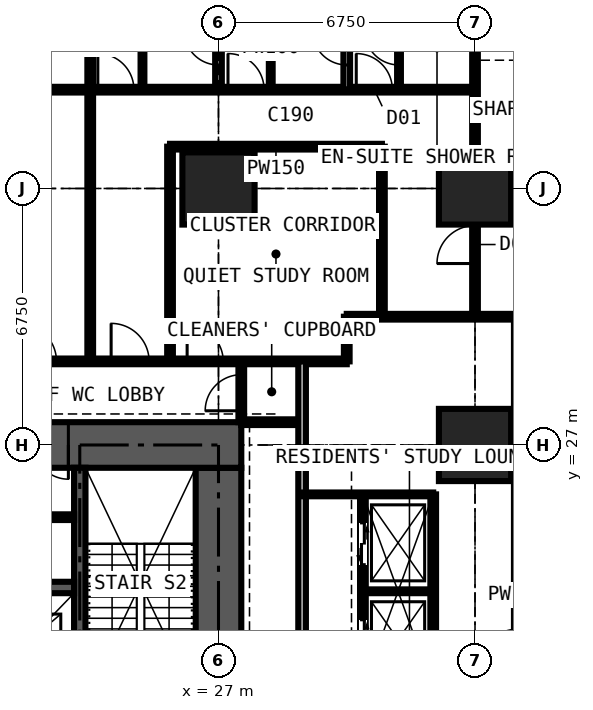
"""IFC4 building model, lengths in metres.
Left out: names, types, materials, properties, quantities, classifications, styles, units other than length and angle.
Written with IfcOpenShell. Run it as: python <this file> out.ifc"""

import sys

from ifc_helpers import new_model, si_unit, direction, frame, frame_2d, origin, origin_2d, place, context, subcontext, project, spatial, rectangle, extrude, element, fill, save


model = new_model("IFC4")
c1 = context("Model", 3, precision=1e-05, world=origin(), true_north=direction((0.0, 1.0)))
c2 = subcontext(c1, "Body", "Model", "MODEL_VIEW")
j1 = project(units=[si_unit("LENGTHUNIT", "METRE"), si_unit("PLANEANGLEUNIT", "RADIAN")], contexts=[c1])
p1 = place(None, origin())
s1 = spatial("IfcSite", under=j1, at=p1, CompositionType="ELEMENT")
p2 = place(p1, origin())
s2 = spatial("IfcBuilding", under=s1, at=p2, CompositionType="ELEMENT")
p3 = place(p2, frame((0.0, 0.0, 36.0)))
s3 = spatial("IfcBuildingStorey", under=s2, at=p3, CompositionType="ELEMENT", Elevation=36.0)
for number, where, z_axis, x_axis in (
    (1, (27.0, 33.75, 0.0), (0.0, 0.0, 1.0), (1.0, 0.0, 0.0)),
    (2, (33.75, 27.0, 0.0), (0.0, 0.0, 1.0), (1.0, 0.0, 0.0)),
    (3, (33.75, 33.75, 0.0), (0.0, 0.0, 1.0), (1.0, 0.0, 0.0)),
):
    element("IfcColumn", number, at=place(p3, frame(where, z_axis=z_axis, x_axis=x_axis)), inside=s3, PredefinedType="COLUMN", context=c2, shape_type="SweptSolid", body=[
        extrude(rectangle(XDim=1.9, YDim=1.9, at=origin_2d()), origin(), (0.0, 0.0, 1.0), 3.6),
    ])
p4 = place(p3, frame((27.0, 14.1, 0.0), z_axis=(0.0, 0.0, 1.0), x_axis=(0.0, 1.0, 0.0)))
e4 = element("IfcWall", 4, at=p4, inside=s3, PredefinedType="SHEAR", context=c2, shape_type="SweptSolid", body=[
    extrude(rectangle(XDim=12.3, YDim=1.2, at=frame_2d((6.15, 0.0))), origin(), (0.0, 0.0, 1.0), 3.6),
])
p5 = place(p4, frame((3.65, 0.0, 0.0)))
e5 = element("IfcOpeningElement", 5, at=p5, cuts=e4, PredefinedType="OPENING", context=c2, shape_type="SweptSolid", body=[
    extrude(rectangle(XDim=1.2, YDim=2.2, at=frame_2d((0.6, 1.1))), frame((0.0, 0.61, 0.0), z_axis=(0.0, -1.0, 0.0), x_axis=(1.0, 0.0, 0.0)), (0.0, 0.0, 1.0), 1.22),
])
p6 = place(p3, frame((27.6, 27.0, 0.0), z_axis=(0.0, 0.0, 1.0), x_axis=(-1.0, 0.0, 0.0)))
e6 = element("IfcWall", 6, at=p6, inside=s3, PredefinedType="SHEAR", context=c2, shape_type="SweptSolid", body=[
    extrude(rectangle(XDim=14.7, YDim=1.2, at=frame_2d((7.35, 0.0))), origin(), (0.0, 0.0, 1.0), 3.6),
])
p7 = place(p6, frame((4.55, 0.0, 0.0)))
e7 = element("IfcOpeningElement", 7, at=p7, cuts=e6, PredefinedType="OPENING", context=c2, shape_type="SweptSolid", body=[
    extrude(rectangle(XDim=0.9, YDim=2.2, at=frame_2d((0.45, 1.1))), frame((0.0, 0.61, 0.0), z_axis=(0.0, -1.0, 0.0), x_axis=(1.0, 0.0, 0.0)), (0.0, 0.0, 1.0), 1.22),
])
p8 = place(p6, frame((7.525, 0.0, 0.0)))
e8 = element("IfcOpeningElement", 8, at=p8, cuts=e6, PredefinedType="OPENING", context=c2, shape_type="SweptSolid", body=[
    extrude(rectangle(XDim=1.0, YDim=2.2, at=frame_2d((0.5, 1.1))), frame((0.0, 0.61, 0.0), z_axis=(0.0, -1.0, 0.0), x_axis=(1.0, 0.0, 0.0)), (0.0, 0.0, 1.0), 1.22),
])
p9 = place(p3, frame((23.35, 20.3, 0.0), z_axis=(0.0, 0.0, 1.0), x_axis=(0.0, 1.0, 0.0)))
e9 = element("IfcWall", 9, at=p9, inside=s3, PredefinedType="SHEAR", context=c2, shape_type="SweptSolid", body=[
    extrude(rectangle(XDim=6.1, YDim=0.3, at=frame_2d((3.05, 0.0))), origin(), (0.0, 0.0, 1.0), 3.6),
])
p10 = place(p3, frame((17.3, 23.25, 0.0), z_axis=(0.0, 0.0, 1.0), x_axis=(1.0, 0.0, 0.0)))
e10 = element("IfcWall", 10, at=p10, inside=s3, PredefinedType="SHEAR", context=c2, shape_type="SweptSolid", body=[
    extrude(rectangle(XDim=5.9, YDim=0.3, at=frame_2d((2.95, 0.0))), origin(), (0.0, 0.0, 1.0), 3.6),
])
p11 = place(p3, frame((20.8, 25.1, 0.0), z_axis=(0.0, 0.0, 1.0), x_axis=(1.0, 0.0, 0.0)))
e11 = element("IfcWall", 11, at=p11, inside=s3, PredefinedType="PARTITIONING", context=c2, shape_type="SweptSolid", body=[
    extrude(rectangle(XDim=2.4, YDim=0.15, at=frame_2d((1.2, 0.0))), origin(), (0.0, 0.0, 1.0), 3.375),
])
p12 = place(p11, frame((0.75, 0.0, 0.0)))
e12 = element("IfcOpeningElement", 12, at=p12, cuts=e11, PredefinedType="OPENING", context=c2, shape_type="SweptSolid", body=[
    extrude(rectangle(XDim=0.9, YDim=2.2, at=frame_2d((0.45, 1.1))), frame((0.0, 0.085, 0.0), z_axis=(0.0, -1.0, 0.0), x_axis=(1.0, 0.0, 0.0)), (0.0, 0.0, 1.0), 0.17),
])
p13 = place(p3, frame((10.125, 36.35, 0.0), z_axis=(0.0, 0.0, 1.0), x_axis=(1.0, 0.0, 0.0)))
e13 = element("IfcWall", 13, at=p13, inside=s3, PredefinedType="PARTITIONING", context=c2, shape_type="SweptSolid", body=[
    extrude(rectangle(XDim=23.625, YDim=0.15, at=frame_2d((11.812, 0.0))), origin(), (0.0, 0.0, 1.0), 3.375),
])
p14 = place(p13, frame((20.5, 0.0, 0.0)))
e14 = element("IfcOpeningElement", 14, at=p14, cuts=e13, PredefinedType="OPENING", context=c2, shape_type="SweptSolid", body=[
    extrude(rectangle(XDim=0.95, YDim=2.2, at=frame_2d((0.475, 1.1))), frame((0.0, 0.085, 0.0), z_axis=(0.0, -1.0, 0.0), x_axis=(1.0, 0.0, 0.0)), (0.0, 0.0, 1.0), 0.17),
])
p15 = place(p13, frame((17.125, 0.0, 0.0)))
e15 = element("IfcOpeningElement", 15, at=p15, cuts=e13, PredefinedType="OPENING", context=c2, shape_type="SweptSolid", body=[
    extrude(rectangle(XDim=0.95, YDim=2.2, at=frame_2d((0.475, 1.1))), frame((0.0, 0.085, 0.0), z_axis=(0.0, -1.0, 0.0), x_axis=(1.0, 0.0, 0.0)), (0.0, 0.0, 1.0), 0.17),
])
p16 = place(p13, frame((13.7, 0.0, 0.0)))
e16 = element("IfcOpeningElement", 16, at=p16, cuts=e13, PredefinedType="OPENING", context=c2, shape_type="SweptSolid", body=[
    extrude(rectangle(XDim=0.95, YDim=2.2, at=frame_2d((0.475, 1.1))), frame((0.0, 0.085, 0.0), z_axis=(0.0, -1.0, 0.0), x_axis=(1.0, 0.0, 0.0)), (0.0, 0.0, 1.0), 0.17),
])
p17 = place(p13, frame((4.2, 0.0, 0.0)))
e17 = element("IfcOpeningElement", 17, at=p17, cuts=e13, PredefinedType="OPENING", context=c2, shape_type="SweptSolid", body=[
    extrude(rectangle(XDim=0.95, YDim=2.2, at=frame_2d((0.475, 1.1))), frame((0.0, 0.085, 0.0), z_axis=(0.0, -1.0, 0.0), x_axis=(1.0, 0.0, 0.0)), (0.0, 0.0, 1.0), 0.17),
])
p18 = place(p13, frame((10.95, 0.0, 0.0)))
e18 = element("IfcOpeningElement", 18, at=p18, cuts=e13, PredefinedType="OPENING", context=c2, shape_type="SweptSolid", body=[
    extrude(rectangle(XDim=0.95, YDim=2.2, at=frame_2d((0.475, 1.1))), frame((0.0, 0.085, 0.0), z_axis=(0.0, -1.0, 0.0), x_axis=(1.0, 0.0, 0.0)), (0.0, 0.0, 1.0), 0.17),
])
p19 = place(p3, frame((11.3, 29.2, 0.0), z_axis=(0.0, 0.0, 1.0), x_axis=(1.0, 0.0, 0.0)))
e19 = element("IfcWall", 19, at=p19, inside=s3, PredefinedType="PARTITIONING", context=c2, shape_type="SweptSolid", body=[
    extrude(rectangle(XDim=19.075, YDim=0.15, at=frame_2d((9.538, 0.0))), origin(), (0.0, 0.0, 1.0), 3.375),
])
p20 = place(p19, frame((12.875, 0.0, 0.0)))
e20 = element("IfcOpeningElement", 20, at=p20, cuts=e19, PredefinedType="OPENING", context=c2, shape_type="SweptSolid", body=[
    extrude(rectangle(XDim=1.0, YDim=2.2, at=frame_2d((0.5, 1.1))), frame((0.0, 0.085, 0.0), z_axis=(0.0, -1.0, 0.0), x_axis=(1.0, 0.0, 0.0)), (0.0, 0.0, 1.0), 0.17),
])
p21 = place(p19, frame((10.438, 0.0, 0.0)))
e21 = element("IfcOpeningElement", 21, at=p21, cuts=e19, PredefinedType="OPENING", context=c2, shape_type="SweptSolid", body=[
    extrude(rectangle(XDim=1.0, YDim=2.2, at=frame_2d((0.5, 1.1))), frame((0.0, 0.085, 0.0), z_axis=(0.0, -1.0, 0.0), x_axis=(1.0, 0.0, 0.0)), (0.0, 0.0, 1.0), 0.17),
])
p22 = place(p19, frame((14.875, 0.0, 0.0)))
e22 = element("IfcOpeningElement", 22, at=p22, cuts=e19, PredefinedType="OPENING", context=c2, shape_type="SweptSolid", body=[
    extrude(rectangle(XDim=0.95, YDim=2.2, at=frame_2d((0.475, 1.1))), frame((0.0, 0.085, 0.0), z_axis=(0.0, -1.0, 0.0), x_axis=(1.0, 0.0, 0.0)), (0.0, 0.0, 1.0), 0.17),
])
p23 = place(p3, frame((23.625, 29.2, 0.0), z_axis=(0.0, 0.0, 1.0), x_axis=(0.0, 1.0, 0.0)))
e23 = element("IfcWall", 23, at=p23, inside=s3, PredefinedType="PARTITIONING", context=c2, shape_type="SweptSolid", body=[
    extrude(rectangle(XDim=12.034, YDim=0.15, at=frame_2d((6.017, 0.0))), origin(), (0.0, 0.0, 1.0), 3.375),
])
p24 = place(p3, frame((25.0, 36.35, 0.0), z_axis=(0.0, 0.0, 1.0), x_axis=(0.0, 1.0, 0.0)))
e24 = element("IfcWall", 24, at=p24, inside=s3, PredefinedType="PARTITIONING", context=c2, shape_type="SweptSolid", body=[
    extrude(rectangle(XDim=2.2, YDim=0.1, at=frame_2d((1.1, 0.0))), origin(), (0.0, 0.0, 1.0), 3.375),
])
p25 = place(p3, frame((25.725, 29.2, 0.0), z_axis=(0.0, 0.0, 1.0), x_axis=(0.0, 1.0, 0.0)))
e25 = element("IfcWall", 25, at=p25, inside=s3, PredefinedType="PARTITIONING", context=c2, shape_type="SweptSolid", body=[
    extrude(rectangle(XDim=5.65, YDim=0.15, at=frame_2d((2.825, 0.0))), origin(), (0.0, 0.0, 1.0), 3.375),
])
p26 = place(p3, frame((25.725, 34.85, 0.0), z_axis=(0.0, 0.0, 1.0), x_axis=(1.0, 0.0, 0.0)))
e26 = element("IfcWall", 26, at=p26, inside=s3, PredefinedType="PARTITIONING", context=c2, shape_type="SweptSolid", body=[
    extrude(rectangle(XDim=5.575, YDim=0.15, at=frame_2d((2.788, 0.0))), origin(), (0.0, 0.0, 1.0), 3.375),
])
p27 = place(p3, frame((27.0, 36.35, 0.0), z_axis=(0.0, 0.0, 1.0), x_axis=(0.0, 1.0, 0.0)))
e27 = element("IfcWall", 27, at=p27, inside=s3, PredefinedType="PARTITIONING", context=c2, shape_type="SweptSolid", body=[
    extrude(rectangle(XDim=4.884, YDim=0.175, at=frame_2d((2.442, 0.0))), origin(), (0.0, 0.0, 1.0), 2.877),
])
p28 = place(p27, frame((0.65, 0.0, 0.0)))
e28 = element("IfcOpeningElement", 28, at=p28, cuts=e27, PredefinedType="OPENING", context=c2, shape_type="SweptSolid", body=[
    extrude(rectangle(XDim=0.9, YDim=2.2, at=frame_2d((0.45, 1.1))), frame((0.0, 0.097, 0.0), z_axis=(0.0, -1.0, 0.0), x_axis=(1.0, 0.0, 0.0)), (0.0, 0.0, 1.0), 0.195),
])
p29 = place(p3, frame((27.6, 27.6, 0.0), z_axis=(0.0, 0.0, 1.0), x_axis=(0.0, 1.0, 0.0)))
e29 = element("IfcWall", 29, at=p29, inside=s3, PredefinedType="PARTITIONING", context=c2, shape_type="SweptSolid", body=[
    extrude(rectangle(XDim=1.6, YDim=0.15, at=frame_2d((0.8, 0.0))), origin(), (0.0, 0.0, 1.0), 3.375),
])
p30 = place(p29, frame((0.3, 0.0, 0.0)))
e30 = element("IfcOpeningElement", 30, at=p30, cuts=e29, PredefinedType="OPENING", context=c2, shape_type="SweptSolid", body=[
    extrude(rectangle(XDim=0.95, YDim=2.2, at=frame_2d((0.475, 1.1))), frame((0.0, 0.085, 0.0), z_axis=(0.0, -1.0, 0.0), x_axis=(1.0, 0.0, 0.0)), (0.0, 0.0, 1.0), 0.17),
])
p31 = place(p3, frame((27.6, 27.6, 0.0), z_axis=(0.0, 0.0, 1.0), x_axis=(1.0, 0.0, 0.0)))
e31 = element("IfcWall", 31, at=p31, inside=s3, PredefinedType="PARTITIONING", context=c2, shape_type="SweptSolid", body=[
    extrude(rectangle(XDim=1.6, YDim=0.15, at=frame_2d((0.8, 0.0))), origin(), (0.0, 0.0, 1.0), 2.877),
])
p32 = place(p3, frame((28.375, 36.35, 0.0), z_axis=(0.0, 0.0, 1.0), x_axis=(0.0, 1.0, 0.0)))
e32 = element("IfcWall", 32, at=p32, inside=s3, PredefinedType="PARTITIONING", context=c2, shape_type="SweptSolid", body=[
    extrude(rectangle(XDim=2.2, YDim=0.1, at=frame_2d((1.1, 0.0))), origin(), (0.0, 0.0, 1.0), 3.375),
])
p33 = place(p3, frame((29.2, 11.3, 0.0), z_axis=(0.0, 0.0, 1.0), x_axis=(0.0, 1.0, 0.0)))
e33 = element("IfcWall", 33, at=p33, inside=s3, PredefinedType="PARTITIONING", context=c2, shape_type="SweptSolid", body=[
    extrude(rectangle(XDim=17.9, YDim=0.2, at=frame_2d((8.95, 0.0))), origin(), (0.0, 0.0, 1.0), 3.375),
])
p34 = place(p33, frame((8.35, 0.0, 0.0)))
e34 = element("IfcOpeningElement", 34, at=p34, cuts=e33, PredefinedType="OPENING", context=c2, shape_type="SweptSolid", body=[
    extrude(rectangle(XDim=1.2, YDim=2.2, at=frame_2d((0.6, 1.1))), frame((0.0, 0.11, 0.0), z_axis=(0.0, -1.0, 0.0), x_axis=(1.0, 0.0, 0.0)), (0.0, 0.0, 1.0), 0.22),
])
p35 = place(p3, frame((29.2, 25.7, 0.0), z_axis=(0.0, 0.0, 1.0), x_axis=(1.0, 0.0, 0.0)))
e35 = element("IfcWall", 35, at=p35, inside=s3, PredefinedType="SHEAR", context=c2, shape_type="SweptSolid", body=[
    extrude(rectangle(XDim=3.45, YDim=0.1, at=frame_2d((1.725, 0.0))), origin(), (0.0, 0.0, 1.0), 3.375),
])
p36 = place(p3, frame((30.375, 29.2, 0.0), z_axis=(0.0, 0.0, 1.0), x_axis=(0.0, 1.0, 0.0)))
e36 = element("IfcWall", 36, at=p36, inside=s3, PredefinedType="PARTITIONING", context=c2, shape_type="SweptSolid", body=[
    extrude(rectangle(XDim=1.175, YDim=0.15, at=frame_2d((0.587, 0.0))), origin(), (0.0, 0.0, 1.0), 3.375),
])
p37 = place(p3, frame((30.375, 30.375, 0.0), z_axis=(0.0, 0.0, 1.0), x_axis=(1.0, 0.0, 0.0)))
e37 = element("IfcWall", 37, at=p37, inside=s3, PredefinedType="PARTITIONING", context=c2, shape_type="SweptSolid", body=[
    extrude(rectangle(XDim=10.859, YDim=0.15, at=frame_2d((5.429, 0.0))), origin(), (0.0, 0.0, 1.0), 3.375),
])
p38 = place(p3, frame((30.375, 36.35, 0.0), z_axis=(0.0, 0.0, 1.0), x_axis=(0.0, 1.0, 0.0)))
e38 = element("IfcWall", 38, at=p38, inside=s3, PredefinedType="PARTITIONING", context=c2, shape_type="SweptSolid", body=[
    extrude(rectangle(XDim=4.884, YDim=0.175, at=frame_2d((2.442, 0.0))), origin(), (0.0, 0.0, 1.0), 3.375),
])
p39 = place(p38, frame((0.65, 0.0, 0.0)))
e39 = element("IfcOpeningElement", 39, at=p39, cuts=e38, PredefinedType="OPENING", context=c2, shape_type="SweptSolid", body=[
    extrude(rectangle(XDim=0.9, YDim=2.2, at=frame_2d((0.45, 1.1))), frame((0.0, 0.097, 0.0), z_axis=(0.0, -1.0, 0.0), x_axis=(1.0, 0.0, 0.0)), (0.0, 0.0, 1.0), 0.195),
])
p40 = place(p3, frame((30.8, 14.8, 0.0), z_axis=(0.0, 0.0, 1.0), x_axis=(0.0, 1.0, 0.0)))
e40 = element("IfcWall", 40, at=p40, inside=s3, PredefinedType="PARTITIONING", context=c2, shape_type="SweptSolid", body=[
    extrude(rectangle(XDim=10.9, YDim=0.15, at=frame_2d((5.45, 0.0))), origin(), (0.0, 0.0, 1.0), 3.375),
])
p41 = place(p40, frame((0.75, 0.0, 0.0)))
e41 = element("IfcOpeningElement", 41, at=p41, cuts=e40, PredefinedType="OPENING", context=c2, shape_type="SweptSolid", body=[
    extrude(rectangle(XDim=1.1, YDim=2.2, at=frame_2d((0.55, 1.1))), frame((0.0, 0.085, 0.0), z_axis=(0.0, -1.0, 0.0), x_axis=(1.0, 0.0, 0.0)), (0.0, 0.0, 1.0), 0.17),
])
p42 = place(p40, frame((3.25, 0.0, 0.0)))
e42 = element("IfcOpeningElement", 42, at=p42, cuts=e40, PredefinedType="OPENING", context=c2, shape_type="SweptSolid", body=[
    extrude(rectangle(XDim=1.1, YDim=2.2, at=frame_2d((0.55, 1.1))), frame((0.0, 0.085, 0.0), z_axis=(0.0, -1.0, 0.0), x_axis=(1.0, 0.0, 0.0)), (0.0, 0.0, 1.0), 0.17),
])
p43 = place(p40, frame((6.5, 0.0, 0.0)))
e43 = element("IfcOpeningElement", 43, at=p43, cuts=e40, PredefinedType="OPENING", context=c2, shape_type="SweptSolid", body=[
    extrude(rectangle(XDim=1.1, YDim=2.2, at=frame_2d((0.55, 1.1))), frame((0.0, 0.085, 0.0), z_axis=(0.0, -1.0, 0.0), x_axis=(1.0, 0.0, 0.0)), (0.0, 0.0, 1.0), 0.17),
])
p44 = place(p40, frame((9.05, 0.0, 0.0)))
e44 = element("IfcOpeningElement", 44, at=p44, cuts=e40, PredefinedType="OPENING", context=c2, shape_type="SweptSolid", body=[
    extrude(rectangle(XDim=1.1, YDim=2.2, at=frame_2d((0.55, 1.1))), frame((0.0, 0.085, 0.0), z_axis=(0.0, -1.0, 0.0), x_axis=(1.0, 0.0, 0.0)), (0.0, 0.0, 1.0), 0.17),
])
p45 = place(p3, frame((30.8, 23.15, 0.0), z_axis=(0.0, 0.0, 1.0), x_axis=(1.0, 0.0, 0.0)))
e45 = element("IfcWall", 45, at=p45, inside=s3, PredefinedType="SHEAR", context=c2, shape_type="SweptSolid", body=[
    extrude(rectangle(XDim=1.85, YDim=0.1, at=frame_2d((0.925, 0.0))), origin(), (0.0, 0.0, 1.0), 3.375),
])
p46 = place(p3, frame((31.3, 30.375, 0.0), z_axis=(0.0, 0.0, 1.0), x_axis=(0.0, 1.0, 0.0)))
e46 = element("IfcWall", 46, at=p46, inside=s3, PredefinedType="PARTITIONING", context=c2, shape_type="SweptSolid", body=[
    extrude(rectangle(XDim=4.475, YDim=0.15, at=frame_2d((2.238, 0.0))), origin(), (0.0, 0.0, 1.0), 3.375),
])
p47 = place(p3, frame((31.75, 36.35, 0.0), z_axis=(0.0, 0.0, 1.0), x_axis=(0.0, 1.0, 0.0)))
e47 = element("IfcWall", 47, at=p47, inside=s3, PredefinedType="PARTITIONING", context=c2, shape_type="SweptSolid", body=[
    extrude(rectangle(XDim=2.2, YDim=0.1, at=frame_2d((1.1, 0.0))), origin(), (0.0, 0.0, 1.0), 3.375),
])
p48 = place(p47, frame((0.65, 0.0, 0.0)))
e48 = element("IfcOpeningElement", 48, at=p48, cuts=e47, PredefinedType="OPENING", context=c2, shape_type="SweptSolid", body=[
    extrude(rectangle(XDim=0.9, YDim=2.2, at=frame_2d((0.45, 1.1))), frame((0.0, 0.06, 0.0), z_axis=(0.0, -1.0, 0.0), x_axis=(1.0, 0.0, 0.0)), (0.0, 0.0, 1.0), 0.12),
])
p49 = place(p3, frame((32.65, 20.6, 0.0), z_axis=(0.0, 0.0, 1.0), x_axis=(0.0, 1.0, 0.0)))
e49 = element("IfcWall", 49, at=p49, inside=s3, PredefinedType="PARTITIONING", context=c2, shape_type="SweptSolid", body=[
    extrude(rectangle(XDim=5.1, YDim=0.15, at=frame_2d((2.55, 0.0))), origin(), (0.0, 0.0, 1.0), 3.375),
])
p50 = place(p3, frame((33.75, 30.375, 0.0), z_axis=(0.0, 0.0, 1.0), x_axis=(0.0, 1.0, 0.0)))
e50 = element("IfcWall", 50, at=p50, inside=s3, PredefinedType="PARTITIONING", context=c2, shape_type="SweptSolid", body=[
    extrude(rectangle(XDim=10.859, YDim=0.15, at=frame_2d((5.429, 0.0))), origin(), (0.0, 0.0, 1.0), 2.877),
])
p51 = place(p50, frame((1.4, 0.0, 0.0)))
e51 = element("IfcOpeningElement", 51, at=p51, cuts=e50, PredefinedType="OPENING", context=c2, shape_type="SweptSolid", body=[
    extrude(rectangle(XDim=1.0, YDim=2.2, at=frame_2d((0.5, 1.1))), frame((0.0, 0.085, 0.0), z_axis=(0.0, -1.0, 0.0), x_axis=(1.0, 0.0, 0.0)), (0.0, 0.0, 1.0), 0.17),
])
p52 = place(p7, origin())
e52 = element("IfcDoor", 52, at=p52, inside=s3, OperationType="SINGLE_SWING_LEFT", PredefinedType="DOOR", context=c2, shape_type="SweptSolid", body=[
    extrude(rectangle(XDim=0.9, YDim=2.2, at=frame_2d((0.45, 1.1))), frame((0.0, 0.4, 0.0), z_axis=(0.0, -1.0, 0.0), x_axis=(1.0, 0.0, 0.0)), (0.0, 0.0, 1.0), 0.8),
])
fill(e7, e52)
p53 = place(p30, origin())
e53 = element("IfcDoor", 53, at=p53, inside=s3, OperationType="SINGLE_SWING_LEFT", PredefinedType="DOOR", context=c2, shape_type="SweptSolid", body=[
    extrude(rectangle(XDim=0.95, YDim=2.2, at=frame_2d((0.475, 1.1))), frame((0.0, 0.025, 0.0), z_axis=(0.0, -1.0, 0.0), x_axis=(1.0, 0.0, 0.0)), (0.0, 0.0, 1.0), 0.05),
])
fill(e30, e53)
p54 = place(p51, origin())
e54 = element("IfcDoor", 54, at=p54, inside=s3, OperationType="SINGLE_SWING_LEFT", PredefinedType="DOOR", context=c2, shape_type="SweptSolid", body=[
    extrude(rectangle(XDim=1.0, YDim=2.2, at=frame_2d((0.5, 1.1))), frame((0.0, 0.025, 0.0), z_axis=(0.0, -1.0, 0.0), x_axis=(1.0, 0.0, 0.0)), (0.0, 0.0, 1.0), 0.05),
])
fill(e51, e54)
p55 = place(p14, origin())
e55 = element("IfcDoor", 55, at=p55, inside=s3, OperationType="SINGLE_SWING_LEFT", PredefinedType="DOOR", context=c2, shape_type="SweptSolid", body=[
    extrude(rectangle(XDim=0.95, YDim=2.2, at=frame_2d((0.475, 1.1))), frame((0.0, 0.025, 0.0), z_axis=(0.0, -1.0, 0.0), x_axis=(1.0, 0.0, 0.0)), (0.0, 0.0, 1.0), 0.05),
])
fill(e14, e55)
p56 = place(p48, origin())
e56 = element("IfcDoor", 56, at=p56, inside=s3, OperationType="SINGLE_SWING_RIGHT", PredefinedType="DOOR", context=c2, shape_type="SweptSolid", body=[
    extrude(rectangle(XDim=0.9, YDim=2.2, at=frame_2d((0.45, 1.1))), frame((0.0, 0.025, 0.0), z_axis=(0.0, -1.0, 0.0), x_axis=(1.0, 0.0, 0.0)), (0.0, 0.0, 1.0), 0.05),
])
fill(e48, e56)
p57 = place(p15, origin())
e57 = element("IfcDoor", 57, at=p57, inside=s3, OperationType="SINGLE_SWING_LEFT", PredefinedType="DOOR", context=c2, shape_type="SweptSolid", body=[
    extrude(rectangle(XDim=0.95, YDim=2.2, at=frame_2d((0.475, 1.1))), frame((0.0, 0.025, 0.0), z_axis=(0.0, -1.0, 0.0), x_axis=(1.0, 0.0, 0.0)), (0.0, 0.0, 1.0), 0.05),
])
fill(e15, e57)
p58 = place(p39, origin())
e58 = element("IfcDoor", 58, at=p58, inside=s3, OperationType="SINGLE_SWING_RIGHT", PredefinedType="DOOR", context=c2, shape_type="SweptSolid", body=[
    extrude(rectangle(XDim=0.9, YDim=2.2, at=frame_2d((0.45, 1.1))), frame((0.0, 0.025, 0.0), z_axis=(0.0, -1.0, 0.0), x_axis=(1.0, 0.0, 0.0)), (0.0, 0.0, 1.0), 0.05),
])
fill(e39, e58)
p59 = place(p16, origin())
e59 = element("IfcDoor", 59, at=p59, inside=s3, OperationType="SINGLE_SWING_LEFT", PredefinedType="DOOR", context=c2, shape_type="SweptSolid", body=[
    extrude(rectangle(XDim=0.95, YDim=2.2, at=frame_2d((0.475, 1.1))), frame((0.0, 0.025, 0.0), z_axis=(0.0, -1.0, 0.0), x_axis=(1.0, 0.0, 0.0)), (0.0, 0.0, 1.0), 0.05),
])
fill(e16, e59)
p60 = place(p28, origin())
e60 = element("IfcDoor", 60, at=p60, inside=s3, OperationType="SINGLE_SWING_RIGHT", PredefinedType="DOOR", context=c2, shape_type="SweptSolid", body=[
    extrude(rectangle(XDim=0.9, YDim=2.2, at=frame_2d((0.45, 1.1))), frame((0.0, 0.025, 0.0), z_axis=(0.0, -1.0, 0.0), x_axis=(1.0, 0.0, 0.0)), (0.0, 0.0, 1.0), 0.05),
])
fill(e28, e60)
p61 = place(p20, origin())
e61 = element("IfcDoor", 61, at=p61, inside=s3, OperationType="SINGLE_SWING_LEFT", PredefinedType="DOOR", context=c2, shape_type="SweptSolid", body=[
    extrude(rectangle(XDim=1.0, YDim=2.2, at=frame_2d((0.5, 1.1))), frame((0.0, 0.025, 0.0), z_axis=(0.0, -1.0, 0.0), x_axis=(1.0, 0.0, 0.0)), (0.0, 0.0, 1.0), 0.05),
])
fill(e20, e61)
p62 = place(p21, origin())
e62 = element("IfcDoor", 62, at=p62, inside=s3, OperationType="SINGLE_SWING_LEFT", PredefinedType="DOOR", context=c2, shape_type="SweptSolid", body=[
    extrude(rectangle(XDim=1.0, YDim=2.2, at=frame_2d((0.5, 1.1))), frame((0.0, 0.025, 0.0), z_axis=(0.0, -1.0, 0.0), x_axis=(1.0, 0.0, 0.0)), (0.0, 0.0, 1.0), 0.05),
])
fill(e21, e62)
p63 = place(p22, origin())
e63 = element("IfcDoor", 63, at=p63, inside=s3, OperationType="SINGLE_SWING_LEFT", PredefinedType="DOOR", context=c2, shape_type="SweptSolid", body=[
    extrude(rectangle(XDim=0.95, YDim=2.2, at=frame_2d((0.475, 1.1))), frame((0.0, 0.025, 0.0), z_axis=(0.0, -1.0, 0.0), x_axis=(1.0, 0.0, 0.0)), (0.0, 0.0, 1.0), 0.05),
])
fill(e22, e63)
p64 = place(p43, origin())
e64 = element("IfcDoor", 64, at=p64, inside=s3, OperationType="DOUBLE_DOOR_SLIDING", PredefinedType="DOOR", context=c2, shape_type="SweptSolid", body=[
    extrude(rectangle(XDim=1.1, YDim=2.2, at=frame_2d((0.55, 1.1))), frame((0.0, 0.025, 0.0), z_axis=(0.0, -1.0, 0.0), x_axis=(1.0, 0.0, 0.0)), (0.0, 0.0, 1.0), 0.05),
])
fill(e43, e64)
p65 = place(p44, origin())
e65 = element("IfcDoor", 65, at=p65, inside=s3, OperationType="DOUBLE_DOOR_SLIDING", PredefinedType="DOOR", context=c2, shape_type="SweptSolid", body=[
    extrude(rectangle(XDim=1.1, YDim=2.2, at=frame_2d((0.55, 1.1))), frame((0.0, 0.025, 0.0), z_axis=(0.0, -1.0, 0.0), x_axis=(1.0, 0.0, 0.0)), (0.0, 0.0, 1.0), 0.05),
])
fill(e44, e65)
save(model, sys.argv[1])
